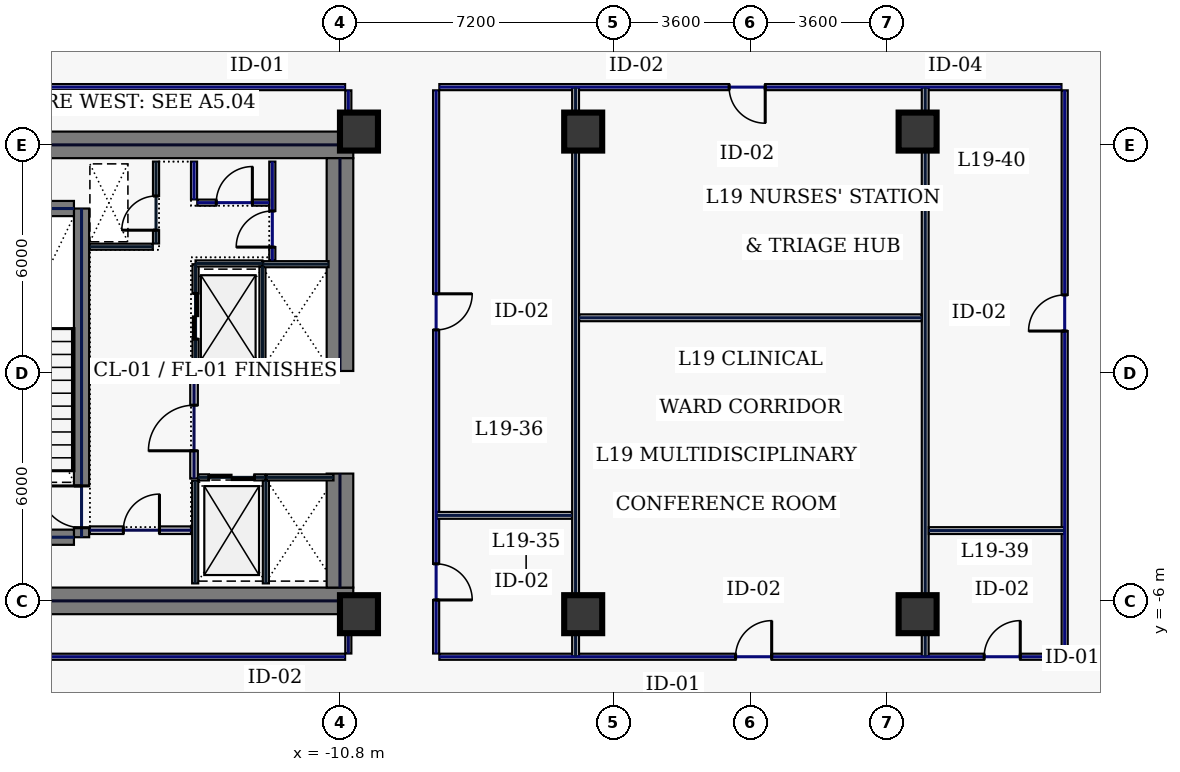
"""IFC4 building model, lengths in metres.
Left out: names, types, materials, properties, quantities, classifications, styles, units other than length and angle.
Written with IfcOpenShell. Run it as: python <this file> out.ifc"""

import sys

from ifc_helpers import new_model, si_unit, direction, frame, frame_2d, origin, origin_2d, place, context, subcontext, project, spatial, rectangle, hollow_rectangle, extrude, element, fill, save


model = new_model("IFC4")
c1 = context("Model", 3, precision=1e-05, world=origin(), true_north=direction((0.0, 1.0)))
c2 = subcontext(c1, "Body", "Model", "MODEL_VIEW")
j1 = project(units=[si_unit("LENGTHUNIT", "METRE"), si_unit("PLANEANGLEUNIT", "RADIAN")], contexts=[c1])
p1 = place(None, origin())
s1 = spatial("IfcSite", under=j1, at=p1, CompositionType="ELEMENT")
p2 = place(p1, origin())
s2 = spatial("IfcBuilding", under=s1, at=p2, CompositionType="ELEMENT")
p3 = place(p2, frame((0.0, 0.0, 89.4)))
s3 = spatial("IfcBuildingStorey", under=s2, at=p3, CompositionType="ELEMENT", Elevation=89.4)
for number, where, z_axis, x_axis in (
    (1, (-22.0, 6.0, 0.0), (0.0, 0.0, 1.0), (1.0, 0.0, 0.0)),
    (2, (-22.0, -6.0, 0.0), (0.0, 0.0, 1.0), (1.0, 0.0, 0.0)),
):
    element("IfcWall", number, at=place(p3, frame(where, z_axis=z_axis, x_axis=x_axis)), inside=s3, PredefinedType="SHEAR", context=c2, shape_type="SweptSolid", body=[
        extrude(rectangle(XDim=11.55, YDim=0.7, at=frame_2d((5.775, 0.0))), origin(), (0.0, 0.0, 1.0), 3.74),
    ])
p4 = place(p3, frame((-10.8, -5.65, 0.0), z_axis=(0.0, 0.0, 1.0), x_axis=(0.0, 1.0, 0.0)))
e3 = element("IfcWall", 3, at=p4, inside=s3, PredefinedType="SHEAR", context=c2, shape_type="SweptSolid", body=[
    extrude(rectangle(XDim=3.0, YDim=0.7, at=frame_2d((1.5, 0.0))), origin(), (0.0, 0.0, 1.0), 3.74),
])
p5 = place(p3, frame((-10.8, 0.05, 0.0), z_axis=(0.0, 0.0, 1.0), x_axis=(0.0, 1.0, 0.0)))
e4 = element("IfcWall", 4, at=p5, inside=s3, PredefinedType="SHEAR", context=c2, shape_type="SweptSolid", body=[
    extrude(rectangle(XDim=5.6, YDim=0.7, at=frame_2d((2.8, 0.0))), origin(), (0.0, 0.0, 1.0), 3.74),
])
p6 = place(p3, frame((-17.6, -4.325, 0.0), z_axis=(0.0, 0.0, 1.0), x_axis=(0.0, 1.0, 0.0)))
e5 = element("IfcWall", 5, at=p6, inside=s3, PredefinedType="SHEAR", context=c2, shape_type="SweptSolid", body=[
    extrude(rectangle(XDim=8.65, YDim=0.4, at=frame_2d((4.325, 0.0))), origin(), (0.0, 0.0, 1.0), 3.74),
])
p7 = place(p6, frame((0.25, 0.0, 0.0)))
e6 = element("IfcOpeningElement", 6, at=p7, cuts=e5, PredefinedType="OPENING", context=c2, shape_type="SweptSolid", body=[
    extrude(rectangle(XDim=1.1, YDim=2.2, at=frame_2d((0.55, 1.1))), frame((0.0, 0.21, 0.0), z_axis=(0.0, -1.0, 0.0), x_axis=(1.0, 0.0, 0.0)), (0.0, 0.0, 1.0), 0.42),
])
for number, where, z_axis, x_axis in (
    (7, (-21.2, -4.325, 0.0), (0.0, 0.0, 1.0), (1.0, 0.0, 0.0)),
    (8, (-21.2, 4.325, 0.0), (0.0, 0.0, 1.0), (1.0, 0.0, 0.0)),
):
    element("IfcWall", number, at=place(p3, frame(where, z_axis=z_axis, x_axis=x_axis)), inside=s3, PredefinedType="SHEAR", context=c2, shape_type="SweptSolid", body=[
        extrude(rectangle(XDim=3.4, YDim=0.4, at=frame_2d((1.7, 0.0))), origin(), (0.0, 0.0, 1.0), 3.74),
    ])
for number, where, z_axis, x_axis in (
    (9, (-10.3, -6.35, 0.0), (0.0, 0.0, 1.0), (1.0, 0.0, 0.0)),
    (10, (-10.3, 6.35, 0.0), (0.0, 0.0, 1.0), (1.0, 0.0, 0.0)),
    (11, (-4.4, -6.35, 0.0), (0.0, 0.0, 1.0), (1.0, 0.0, 0.0)),
    (12, (4.4, -6.35, 0.0), (0.0, 0.0, 1.0), (1.0, 0.0, 0.0)),
    (13, (-4.4, 6.35, 0.0), (0.0, 0.0, 1.0), (1.0, 0.0, 0.0)),
    (14, (4.4, 6.35, 0.0), (0.0, 0.0, 1.0), (1.0, 0.0, 0.0)),
):
    element("IfcColumn", number, at=place(p3, frame(where, z_axis=z_axis, x_axis=x_axis)), inside=s3, PredefinedType="COLUMN", context=c2, shape_type="SweptSolid", body=[
        extrude(hollow_rectangle(XDim=1.0, YDim=1.0, WallThickness=0.045, at=origin_2d()), origin(), (0.0, 0.0, 1.0), 3.74),
    ])
p8 = place(p3, frame((-14.6, 0.12, 0.0), z_axis=(0.0, 0.0, 1.0), x_axis=(0.0, 1.0, 0.0)))
e15 = element("IfcWall", 15, at=p8, inside=s3, PredefinedType="PARTITIONING", context=c2, shape_type="SweptSolid", body=[
    extrude(rectangle(XDim=2.74, YDim=0.16, at=frame_2d((1.37, 0.0))), origin(), (0.0, 0.0, 1.0), 3.74),
])
p9 = place(p8, frame((0.77, 0.0, 0.0)))
e16 = element("IfcOpeningElement", 16, at=p9, cuts=e15, PredefinedType="OPENING", context=c2, shape_type="SweptSolid", body=[
    extrude(rectangle(XDim=1.2, YDim=2.2, at=frame_2d((0.6, 1.1))), frame((0.0, 0.09, 0.0), z_axis=(0.0, -1.0, 0.0), x_axis=(1.0, 0.0, 0.0)), (0.0, 0.0, 1.0), 0.18),
])
for number, where, z_axis, x_axis in (
    (17, (-14.6, 0.1, 0.0), (0.0, 0.0, 1.0), (1.0, 0.0, 0.0)),
    (18, (-14.6, 2.88, 0.0), (0.0, 0.0, 1.0), (1.0, 0.0, 0.0)),
):
    element("IfcWall", number, at=place(p3, frame(where, z_axis=z_axis, x_axis=x_axis)), inside=s3, PredefinedType="PARTITIONING", context=c2, shape_type="SweptSolid", body=[
        extrude(rectangle(XDim=1.76, YDim=0.16, at=frame_2d((0.88, 0.0))), origin(), (0.0, 0.0, 1.0), 3.74),
    ])
p10 = place(p3, frame((-12.84, 0.18, 0.0), z_axis=(0.0, 0.0, 1.0), x_axis=(0.0, 1.0, 0.0)))
e19 = element("IfcWall", 19, at=p10, inside=s3, PredefinedType="PARTITIONING", context=c2, shape_type="SweptSolid", body=[
    extrude(rectangle(XDim=2.62, YDim=0.16, at=frame_2d((1.31, 0.0))), origin(), (0.0, 0.0, 1.0), 3.74),
])
p11 = place(p3, frame((-14.53, -2.75, 0.0), z_axis=(0.0, 0.0, 1.0), x_axis=(1.0, 0.0, 0.0)))
e20 = element("IfcWall", 20, at=p11, inside=s3, PredefinedType="PARTITIONING", context=c2, shape_type="SweptSolid", body=[
    extrude(rectangle(XDim=1.76, YDim=0.16, at=frame_2d((0.88, 0.0))), origin(), (0.0, 0.0, 1.0), 3.74),
])
p12 = place(p11, frame((0.28, 0.0, 0.0)))
e21 = element("IfcOpeningElement", 21, at=p12, cuts=e20, PredefinedType="OPENING", context=c2, shape_type="SweptSolid", body=[
    extrude(rectangle(XDim=1.2, YDim=2.2, at=frame_2d((0.6, 1.1))), frame((0.0, 0.09, 0.0), z_axis=(0.0, -1.0, 0.0), x_axis=(1.0, 0.0, 0.0)), (0.0, 0.0, 1.0), 0.18),
])
for number, where, z_axis, x_axis in (
    (22, (-12.75, -5.54, 0.0), (0.0, 0.0, 1.0), (0.0, 1.0, 0.0)),
    (23, (-14.61, -5.54, 0.0), (0.0, 0.0, 1.0), (0.0, 1.0, 0.0)),
):
    element("IfcWall", number, at=place(p3, frame(where, z_axis=z_axis, x_axis=x_axis)), inside=s3, PredefinedType="PARTITIONING", context=c2, shape_type="SweptSolid", body=[
        extrude(rectangle(XDim=2.7, YDim=0.16, at=frame_2d((1.35, 0.0))), origin(), (0.0, 0.0, 1.0), 3.74),
    ])
p13 = place(p3, frame((-12.73, -2.75, 0.0), z_axis=(0.0, 0.0, 1.0), x_axis=(1.0, 0.0, 0.0)))
e24 = element("IfcWall", 24, at=p13, inside=s3, PredefinedType="PARTITIONING", context=c2, shape_type="SweptSolid", body=[
    extrude(rectangle(XDim=1.76, YDim=0.16, at=frame_2d((0.88, 0.0))), origin(), (0.0, 0.0, 1.0), 3.74),
])
for number, where, z_axis, x_axis in (
    (25, (-12.82, 0.06, 0.0), (0.0, 0.0, 1.0), (1.0, 0.0, 0.0)),
    (26, (-12.82, 2.86, 0.0), (0.0, 0.0, 1.0), (1.0, 0.0, 0.0)),
):
    element("IfcWall", number, at=place(p3, frame(where, z_axis=z_axis, x_axis=x_axis)), inside=s3, PredefinedType="PARTITIONING", context=c2, shape_type="SweptSolid", body=[
        extrude(rectangle(XDim=1.72, YDim=0.16, at=frame_2d((0.86, 0.0))), origin(), (0.0, 0.0, 1.0), 3.74),
    ])
p14 = place(p3, frame((-15.64, 3.405, 0.0), z_axis=(0.0, 0.0, 1.0), x_axis=(0.0, 1.0, 0.0)))
e27 = element("IfcWall", 27, at=p14, inside=s3, PredefinedType="PARTITIONING", context=c2, shape_type="SweptSolid", body=[
    extrude(rectangle(XDim=2.155, YDim=0.16, at=frame_2d((1.078, 0.0))), origin(), (0.0, 0.0, 1.0), 3.74),
])
p15 = place(p14, frame((0.35, 0.0, 0.0)))
e28 = element("IfcOpeningElement", 28, at=p15, cuts=e27, PredefinedType="OPENING", context=c2, shape_type="SweptSolid", body=[
    extrude(rectangle(XDim=0.9, YDim=2.2, at=frame_2d((0.45, 1.1))), frame((0.0, 0.09, 0.0), z_axis=(0.0, -1.0, 0.0), x_axis=(1.0, 0.0, 0.0)), (0.0, 0.0, 1.0), 0.18),
])
p16 = place(p3, frame((-17.38, 3.32, 0.0), z_axis=(0.0, 0.0, 1.0), x_axis=(1.0, 0.0, 0.0)))
e29 = element("IfcWall", 29, at=p16, inside=s3, PredefinedType="PARTITIONING", context=c2, shape_type="SweptSolid", body=[
    extrude(rectangle(XDim=1.655, YDim=0.16, at=frame_2d((0.827, 0.0))), origin(), (0.0, 0.0, 1.0), 3.74),
])
p17 = place(p3, frame((-17.38, -4.14, 0.0), z_axis=(0.0, 0.0, 1.0), x_axis=(1.0, 0.0, 0.0)))
e30 = element("IfcWall", 30, at=p17, inside=s3, PredefinedType="SOLIDWALL", context=c2, shape_type="SweptSolid", body=[
    extrude(rectangle(XDim=2.66, YDim=0.2, at=frame_2d((1.33, 0.0))), origin(), (0.0, 0.0, 1.0), 3.74),
])
p18 = place(p17, frame((0.88, 0.0, 0.0)))
e31 = element("IfcOpeningElement", 31, at=p18, cuts=e30, PredefinedType="OPENING", context=c2, shape_type="SweptSolid", body=[
    extrude(rectangle(XDim=0.95, YDim=2.2, at=frame_2d((0.475, 1.1))), frame((0.0, 0.11, 0.0), z_axis=(0.0, -1.0, 0.0), x_axis=(1.0, 0.0, 0.0)), (0.0, 0.0, 1.0), 0.22),
])
p19 = place(p3, frame((-12.58, 2.96, 0.0), z_axis=(0.0, 0.0, 1.0), x_axis=(0.0, 1.0, 0.0)))
e32 = element("IfcWall", 32, at=p19, inside=s3, PredefinedType="PARTITIONING", context=c2, shape_type="SweptSolid", body=[
    extrude(rectangle(XDim=2.6, YDim=0.16, at=frame_2d((1.3, 0.0))), origin(), (0.0, 0.0, 1.0), 3.74),
])
p20 = place(p19, frame((0.35, 0.0, 0.0)))
e33 = element("IfcOpeningElement", 33, at=p20, cuts=e32, PredefinedType="OPENING", context=c2, shape_type="SweptSolid", body=[
    extrude(rectangle(XDim=0.95, YDim=2.2, at=frame_2d((0.475, 1.1))), frame((0.0, 0.09, 0.0), z_axis=(0.0, -1.0, 0.0), x_axis=(1.0, 0.0, 0.0)), (0.0, 0.0, 1.0), 0.18),
])
p21 = place(p3, frame((-14.555, 4.48, 0.0), z_axis=(0.0, 0.0, 1.0), x_axis=(1.0, 0.0, 0.0)))
e34 = element("IfcWall", 34, at=p21, inside=s3, PredefinedType="PARTITIONING", context=c2, shape_type="SweptSolid", body=[
    extrude(rectangle(XDim=1.89, YDim=0.16, at=frame_2d((0.945, 0.0))), origin(), (0.0, 0.0, 1.0), 3.74),
])
p22 = place(p21, frame((0.5, 0.0, 0.0)))
e35 = element("IfcOpeningElement", 35, at=p22, cuts=e34, PredefinedType="OPENING", context=c2, shape_type="SweptSolid", body=[
    extrude(rectangle(XDim=0.95, YDim=2.2, at=frame_2d((0.475, 1.1))), frame((0.0, 0.09, 0.0), z_axis=(0.0, -1.0, 0.0), x_axis=(1.0, 0.0, 0.0)), (0.0, 0.0, 1.0), 0.18),
])
p23 = place(p3, frame((-14.64, 4.565, 0.0), z_axis=(0.0, 0.0, 1.0), x_axis=(0.0, 1.0, 0.0)))
e36 = element("IfcWall", 36, at=p23, inside=s3, PredefinedType="PARTITIONING", context=c2, shape_type="SweptSolid", body=[
    extrude(rectangle(XDim=0.995, YDim=0.16, at=frame_2d((0.498, 0.0))), origin(), (0.0, 0.0, 1.0), 3.74),
])
p24 = place(p3, frame((-14.64, -2.78, 0.0), z_axis=(0.0, 0.0, 1.0), x_axis=(0.0, 1.0, 0.0)))
e37 = element("IfcWall", 37, at=p24, inside=s3, PredefinedType="SOLIDWALL", context=c2, shape_type="SweptSolid", body=[
    extrude(rectangle(XDim=2.82, YDim=0.2, at=frame_2d((1.41, 0.0))), origin(), (0.0, 0.0, 1.0), 3.74),
])
p25 = place(p24, frame((0.73, 0.0, 0.0)))
e38 = element("IfcOpeningElement", 38, at=p25, cuts=e37, PredefinedType="OPENING", context=c2, shape_type="SweptSolid", body=[
    extrude(rectangle(XDim=1.2, YDim=2.2, at=frame_2d((0.6, 1.1))), frame((0.0, 0.11, 0.0), z_axis=(0.0, -1.0, 0.0), x_axis=(1.0, 0.0, 0.0)), (0.0, 0.0, 1.0), 0.22),
])
p26 = place(p3, frame((8.27, -7.385, 0.0), z_axis=(0.0, 0.0, 1.0), x_axis=(0.0, 1.0, 0.0)))
e39 = element("IfcWall", 39, at=p26, inside=s3, PredefinedType="PARTITIONING", context=c2, shape_type="SweptSolid", body=[
    extrude(rectangle(XDim=14.82, YDim=0.16, at=frame_2d((7.41, 0.0))), origin(), (0.0, 0.0, 1.0), 3.74),
])
p27 = place(p26, frame((8.486, 0.0, 0.0)))
e40 = element("IfcOpeningElement", 40, at=p27, cuts=e39, PredefinedType="OPENING", context=c2, shape_type="SweptSolid", body=[
    extrude(rectangle(XDim=0.95, YDim=2.2, at=frame_2d((0.475, 1.1))), frame((0.0, 0.09, 0.0), z_axis=(0.0, -1.0, 0.0), x_axis=(1.0, 0.0, 0.0)), (0.0, 0.0, 1.0), 0.18),
])
p28 = place(p3, frame((8.185, 7.52, 0.0), z_axis=(0.0, 0.0, 1.0), x_axis=(-1.0, 0.0, 0.0)))
e41 = element("IfcWall", 41, at=p28, inside=s3, PredefinedType="PARTITIONING", context=c2, shape_type="SweptSolid", body=[
    extrude(rectangle(XDim=16.37, YDim=0.16, at=frame_2d((8.185, 0.0))), origin(), (0.0, 0.0, 1.0), 3.74),
])
p29 = place(p28, frame((7.795, 0.0, 0.0)))
e42 = element("IfcOpeningElement", 42, at=p29, cuts=e41, PredefinedType="OPENING", context=c2, shape_type="SweptSolid", body=[
    extrude(rectangle(XDim=0.95, YDim=2.2, at=frame_2d((0.475, 1.1))), frame((0.0, 0.09, 0.0), z_axis=(0.0, -1.0, 0.0), x_axis=(1.0, 0.0, 0.0)), (0.0, 0.0, 1.0), 0.18),
])
p30 = place(p3, frame((-8.27, 7.435, 0.0), z_axis=(0.0, 0.0, 1.0), x_axis=(0.0, -1.0, 0.0)))
e43 = element("IfcWall", 43, at=p30, inside=s3, PredefinedType="PARTITIONING", context=c2, shape_type="SweptSolid", body=[
    extrude(rectangle(XDim=14.82, YDim=0.16, at=frame_2d((7.41, 0.0))), origin(), (0.0, 0.0, 1.0), 3.74),
])
p31 = place(p30, frame((12.461, 0.0, 0.0)))
e44 = element("IfcOpeningElement", 44, at=p31, cuts=e43, PredefinedType="OPENING", context=c2, shape_type="SweptSolid", body=[
    extrude(rectangle(XDim=0.95, YDim=2.2, at=frame_2d((0.475, 1.1))), frame((0.0, 0.09, 0.0), z_axis=(0.0, -1.0, 0.0), x_axis=(1.0, 0.0, 0.0)), (0.0, 0.0, 1.0), 0.18),
])
p32 = place(p30, frame((5.354, 0.0, 0.0)))
e45 = element("IfcOpeningElement", 45, at=p32, cuts=e43, PredefinedType="OPENING", context=c2, shape_type="SweptSolid", body=[
    extrude(rectangle(XDim=0.95, YDim=2.2, at=frame_2d((0.475, 1.1))), frame((0.0, 0.09, 0.0), z_axis=(0.0, -1.0, 0.0), x_axis=(1.0, 0.0, 0.0)), (0.0, 0.0, 1.0), 0.18),
])
p33 = place(p3, frame((-8.185, -7.47, 0.0), z_axis=(0.0, 0.0, 1.0), x_axis=(1.0, 0.0, 0.0)))
e46 = element("IfcWall", 46, at=p33, inside=s3, PredefinedType="PARTITIONING", context=c2, shape_type="SweptSolid", body=[
    extrude(rectangle(XDim=16.37, YDim=0.16, at=frame_2d((8.185, 0.0))), origin(), (0.0, 0.0, 1.0), 3.74),
])
p34 = place(p33, frame((7.795, 0.0, 0.0)))
e47 = element("IfcOpeningElement", 47, at=p34, cuts=e46, PredefinedType="OPENING", context=c2, shape_type="SweptSolid", body=[
    extrude(rectangle(XDim=0.95, YDim=2.2, at=frame_2d((0.475, 1.1))), frame((0.0, 0.09, 0.0), z_axis=(0.0, -1.0, 0.0), x_axis=(1.0, 0.0, 0.0)), (0.0, 0.0, 1.0), 0.18),
])
p35 = place(p33, frame((14.336, 0.0, 0.0)))
e48 = element("IfcOpeningElement", 48, at=p35, cuts=e46, PredefinedType="OPENING", context=c2, shape_type="SweptSolid", body=[
    extrude(rectangle(XDim=0.95, YDim=2.2, at=frame_2d((0.475, 1.1))), frame((0.0, 0.09, 0.0), z_axis=(0.0, -1.0, 0.0), x_axis=(1.0, 0.0, 0.0)), (0.0, 0.0, 1.0), 0.18),
])
p36 = place(p3, frame((-10.58, -7.385, 0.0), z_axis=(0.0, 0.0, 1.0), x_axis=(0.0, 1.0, 0.0)))
e49 = element("IfcWall", 49, at=p36, inside=s3, PredefinedType="PARTITIONING", context=c2, shape_type="SweptSolid", body=[
    extrude(rectangle(XDim=0.965, YDim=0.16, at=frame_2d((0.482, 0.0))), origin(), (0.0, 0.0, 1.0), 1.535),
])
p37 = place(p3, frame((-10.58, 6.42, 0.0), z_axis=(0.0, 0.0, 1.0), x_axis=(0.0, 1.0, 0.0)))
e50 = element("IfcWall", 50, at=p37, inside=s3, PredefinedType="PARTITIONING", context=c2, shape_type="SweptSolid", body=[
    extrude(rectangle(XDim=1.015, YDim=0.16, at=frame_2d((0.508, 0.0))), origin(), (0.0, 0.0, 1.0), 3.74),
])
for number, where, z_axis, x_axis in (
    (51, (-10.665, 7.52, 0.0), (0.0, 0.0, 1.0), (-1.0, 0.0, 0.0)),
    (52, (-25.235, -7.47, 0.0), (0.0, 0.0, 1.0), (1.0, 0.0, 0.0)),
):
    element("IfcWall", number, at=place(p3, frame(where, z_axis=z_axis, x_axis=x_axis)), inside=s3, PredefinedType="PARTITIONING", context=c2, shape_type="SweptSolid", body=[
        extrude(rectangle(XDim=14.57, YDim=0.16, at=frame_2d((7.285, 0.0))), origin(), (0.0, 0.0, 1.0), 3.74),
    ])
for number, where, z_axis, x_axis in (
    (53, (-4.6, -7.465, 0.0), (0.0, 0.0, 1.0), (0.0, 1.0, 0.0)),
    (54, (4.6, -7.465, 0.0), (0.0, 0.0, 1.0), (0.0, 1.0, 0.0)),
):
    element("IfcWall", number, at=place(p3, frame(where, z_axis=z_axis, x_axis=x_axis)), inside=s3, PredefinedType="PARTITIONING", context=c2, shape_type="SweptSolid", body=[
        extrude(rectangle(XDim=14.98, YDim=0.18, at=frame_2d((7.49, 0.0))), origin(), (0.0, 0.0, 1.0), 1.535),
    ])
p38 = place(p3, frame((-4.505, 1.45, 0.0), z_axis=(0.0, 0.0, 1.0), x_axis=(1.0, 0.0, 0.0)))
e55 = element("IfcWall", 55, at=p38, inside=s3, PredefinedType="PARTITIONING", context=c2, shape_type="SweptSolid", body=[
    extrude(rectangle(XDim=9.01, YDim=0.18, at=frame_2d((4.505, 0.0))), origin(), (0.0, 0.0, 1.0), 3.74),
])
for number, where, z_axis, x_axis in (
    (56, (-8.265, -3.75, 0.0), (0.0, 0.0, 1.0), (1.0, 0.0, 0.0)),
    (57, (4.695, -4.15, 0.0), (0.0, 0.0, 1.0), (1.0, 0.0, 0.0)),
):
    element("IfcWall", number, at=place(p3, frame(where, z_axis=z_axis, x_axis=x_axis)), inside=s3, PredefinedType="PARTITIONING", context=c2, shape_type="SweptSolid", body=[
        extrude(rectangle(XDim=3.57, YDim=0.18, at=frame_2d((1.785, 0.0))), origin(), (0.0, 0.0, 1.0), 3.74),
    ])
p39 = place(p7, origin())
e58 = element("IfcDoor", 58, at=p39, inside=s3, OperationType="SINGLE_SWING_RIGHT", PredefinedType="DOOR", context=c2, shape_type="SweptSolid", body=[
    extrude(rectangle(XDim=1.1, YDim=2.2, at=frame_2d((0.55, 1.1))), frame((0.0, 0.025, 0.0), z_axis=(0.0, -1.0, 0.0), x_axis=(1.0, 0.0, 0.0)), (0.0, 0.0, 1.0), 0.05),
])
fill(e6, e58)
p40 = place(p9, origin())
e59 = element("IfcDoor", 59, at=p40, inside=s3, OperationType="SLIDING_TO_LEFT", PredefinedType="DOOR", context=c2, shape_type="SweptSolid", body=[
    extrude(rectangle(XDim=1.2, YDim=2.2, at=frame_2d((0.6, 1.1))), frame((0.0, 0.025, 0.0), z_axis=(0.0, -1.0, 0.0), x_axis=(1.0, 0.0, 0.0)), (0.0, 0.0, 1.0), 0.05),
])
fill(e16, e59)
p41 = place(p12, origin())
e60 = element("IfcDoor", 60, at=p41, inside=s3, OperationType="SLIDING_TO_LEFT", PredefinedType="DOOR", context=c2, shape_type="SweptSolid", body=[
    extrude(rectangle(XDim=1.2, YDim=2.2, at=frame_2d((0.6, 1.1))), frame((0.0, 0.025, 0.0), z_axis=(0.0, -1.0, 0.0), x_axis=(1.0, 0.0, 0.0)), (0.0, 0.0, 1.0), 0.05),
])
fill(e21, e60)
p42 = place(p15, origin())
e61 = element("IfcDoor", 61, at=p42, inside=s3, OperationType="SINGLE_SWING_LEFT", PredefinedType="DOOR", context=c2, shape_type="SweptSolid", body=[
    extrude(rectangle(XDim=0.9, YDim=2.2, at=frame_2d((0.45, 1.1))), frame((0.0, 0.025, 0.0), z_axis=(0.0, -1.0, 0.0), x_axis=(1.0, 0.0, 0.0)), (0.0, 0.0, 1.0), 0.05),
])
fill(e28, e61)
p43 = place(p18, origin())
e62 = element("IfcDoor", 62, at=p43, inside=s3, OperationType="SINGLE_SWING_RIGHT", PredefinedType="DOOR", context=c2, shape_type="SweptSolid", body=[
    extrude(rectangle(XDim=0.95, YDim=2.2, at=frame_2d((0.475, 1.1))), frame((0.0, 0.025, 0.0), z_axis=(0.0, -1.0, 0.0), x_axis=(1.0, 0.0, 0.0)), (0.0, 0.0, 1.0), 0.05),
])
fill(e31, e62)
p44 = place(p20, origin())
e63 = element("IfcDoor", 63, at=p44, inside=s3, OperationType="SINGLE_SWING_LEFT", PredefinedType="DOOR", context=c2, shape_type="SweptSolid", body=[
    extrude(rectangle(XDim=0.95, YDim=2.2, at=frame_2d((0.475, 1.1))), frame((0.0, 0.025, 0.0), z_axis=(0.0, -1.0, 0.0), x_axis=(1.0, 0.0, 0.0)), (0.0, 0.0, 1.0), 0.05),
])
fill(e33, e63)
p45 = place(p22, origin())
e64 = element("IfcDoor", 64, at=p45, inside=s3, OperationType="SINGLE_SWING_RIGHT", PredefinedType="DOOR", context=c2, shape_type="SweptSolid", body=[
    extrude(rectangle(XDim=0.95, YDim=2.2, at=frame_2d((0.475, 1.1))), frame((0.0, 0.025, 0.0), z_axis=(0.0, -1.0, 0.0), x_axis=(1.0, 0.0, 0.0)), (0.0, 0.0, 1.0), 0.05),
])
fill(e35, e64)
p46 = place(p25, origin())
e65 = element("IfcDoor", 65, at=p46, inside=s3, OperationType="SINGLE_SWING_LEFT", PredefinedType="DOOR", context=c2, shape_type="SweptSolid", body=[
    extrude(rectangle(XDim=1.2, YDim=2.2, at=frame_2d((0.6, 1.1))), frame((0.0, 0.025, 0.0), z_axis=(0.0, -1.0, 0.0), x_axis=(1.0, 0.0, 0.0)), (0.0, 0.0, 1.0), 0.05),
])
fill(e38, e65)
p47 = place(p31, origin())
e66 = element("IfcDoor", 66, at=p47, inside=s3, OperationType="SINGLE_SWING_RIGHT", PredefinedType="DOOR", context=c2, shape_type="SweptSolid", body=[
    extrude(rectangle(XDim=0.95, YDim=2.2, at=frame_2d((0.475, 1.1))), frame((0.0, 0.025, 0.0), z_axis=(0.0, -1.0, 0.0), x_axis=(1.0, 0.0, 0.0)), (0.0, 0.0, 1.0), 0.05),
])
fill(e44, e66)
p48 = place(p32, origin())
e67 = element("IfcDoor", 67, at=p48, inside=s3, OperationType="SINGLE_SWING_LEFT", PredefinedType="DOOR", context=c2, shape_type="SweptSolid", body=[
    extrude(rectangle(XDim=0.95, YDim=2.2, at=frame_2d((0.475, 1.1))), frame((0.0, 0.025, 0.0), z_axis=(0.0, -1.0, 0.0), x_axis=(1.0, 0.0, 0.0)), (0.0, 0.0, 1.0), 0.05),
])
fill(e45, e67)
p49 = place(p34, origin())
e68 = element("IfcDoor", 68, at=p49, inside=s3, OperationType="SINGLE_SWING_RIGHT", PredefinedType="DOOR", context=c2, shape_type="SweptSolid", body=[
    extrude(rectangle(XDim=0.95, YDim=2.2, at=frame_2d((0.475, 1.1))), frame((0.0, 0.025, 0.0), z_axis=(0.0, -1.0, 0.0), x_axis=(1.0, 0.0, 0.0)), (0.0, 0.0, 1.0), 0.05),
])
fill(e47, e68)
p50 = place(p29, origin())
e69 = element("IfcDoor", 69, at=p50, inside=s3, OperationType="SINGLE_SWING_LEFT", PredefinedType="DOOR", context=c2, shape_type="SweptSolid", body=[
    extrude(rectangle(XDim=0.95, YDim=2.2, at=frame_2d((0.475, 1.1))), frame((0.0, 0.025, 0.0), z_axis=(0.0, -1.0, 0.0), x_axis=(1.0, 0.0, 0.0)), (0.0, 0.0, 1.0), 0.05),
])
fill(e42, e69)
p51 = place(p35, origin())
e70 = element("IfcDoor", 70, at=p51, inside=s3, OperationType="SINGLE_SWING_RIGHT", PredefinedType="DOOR", context=c2, shape_type="SweptSolid", body=[
    extrude(rectangle(XDim=0.95, YDim=2.2, at=frame_2d((0.475, 1.1))), frame((0.0, 0.025, 0.0), z_axis=(0.0, -1.0, 0.0), x_axis=(1.0, 0.0, 0.0)), (0.0, 0.0, 1.0), 0.05),
])
fill(e48, e70)
p52 = place(p27, origin())
e71 = element("IfcDoor", 71, at=p52, inside=s3, OperationType="SINGLE_SWING_LEFT", PredefinedType="DOOR", context=c2, shape_type="SweptSolid", body=[
    extrude(rectangle(XDim=0.95, YDim=2.2, at=frame_2d((0.475, 1.1))), frame((0.0, 0.025, 0.0), z_axis=(0.0, -1.0, 0.0), x_axis=(1.0, 0.0, 0.0)), (0.0, 0.0, 1.0), 0.05),
])
fill(e40, e71)
save(model, sys.argv[1])
